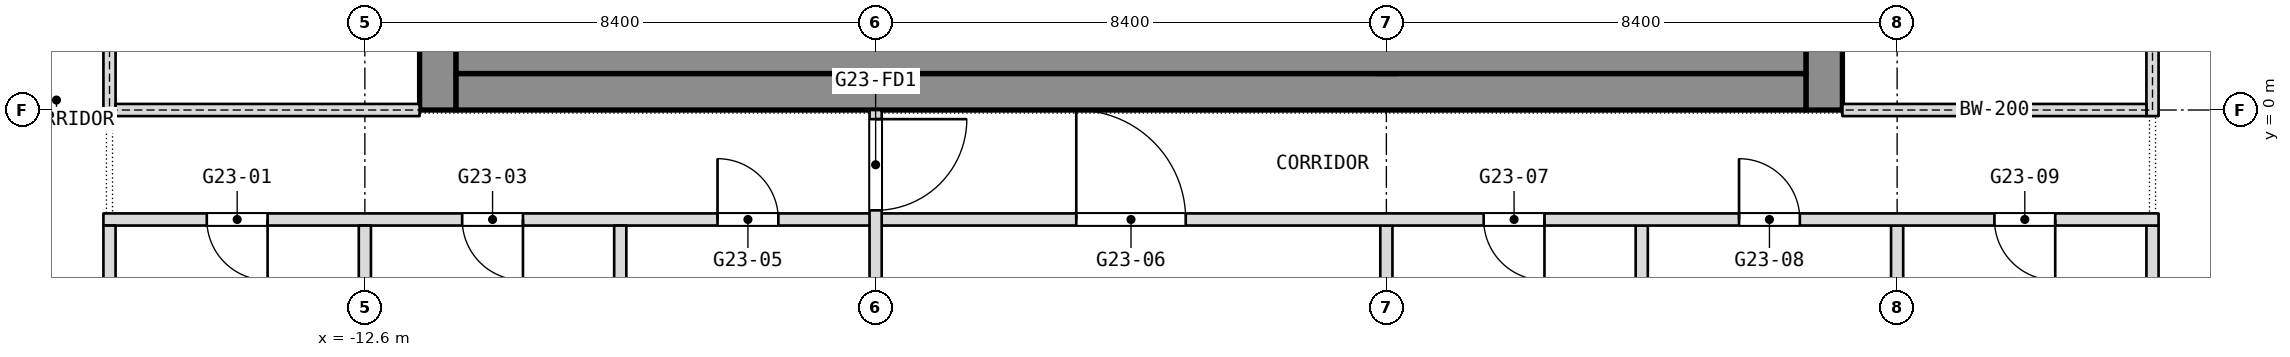
"""IFC4 building model, lengths in metres.
Left out: names, types, materials, properties, quantities, classifications, styles, units other than length and angle.
Written with IfcOpenShell. Run it as: python <this file> out.ifc"""

import sys

from ifc_helpers import new_model, si_unit, direction, frame, frame_2d, origin, place, context, subcontext, project, spatial, rectangle, extrude, element, fill, save


model = new_model("IFC4")
c1 = context("Model", 3, precision=1e-05, world=origin(), true_north=direction((0.0, 1.0)))
c2 = subcontext(c1, "Body", "Model", "MODEL_VIEW")
j1 = project(units=[si_unit("LENGTHUNIT", "METRE"), si_unit("PLANEANGLEUNIT", "RADIAN")], contexts=[c1])
p1 = place(None, origin())
s1 = spatial("IfcSite", under=j1, at=p1, CompositionType="ELEMENT")
p2 = place(p1, origin())
s2 = spatial("IfcBuilding", under=s1, at=p2, CompositionType="ELEMENT")
p3 = place(p2, frame((0.0, 0.0, 274.1)))
s3 = spatial("IfcBuildingStorey", under=s2, at=p3, CompositionType="ELEMENT", Elevation=274.1)
p4 = place(p3, frame((11.4, 0.0, 0.0), z_axis=(0.0, 0.0, 1.0), x_axis=(0.0, 1.0, 0.0)))
e1 = element("IfcWall", 1, at=p4, inside=s3, PredefinedType="SHEAR", context=c2, shape_type="SweptSolid", body=[
    extrude(rectangle(XDim=16.8, YDim=0.6, at=frame_2d((8.4, 0.0))), origin(), (0.0, 0.0, 1.0), 3.6),
])
p5 = place(p4, frame((2.3, 0.0, 0.0)))
e2 = element("IfcOpeningElement", 2, at=p5, cuts=e1, PredefinedType="OPENING", context=c2, shape_type="SweptSolid", body=[
    extrude(rectangle(XDim=1.1, YDim=2.1, at=frame_2d((0.55, 1.05))), frame((0.0, 0.3, 0.0), z_axis=(0.0, -1.0, 0.0), x_axis=(1.0, 0.0, 0.0)), (0.0, 0.0, 1.0), 0.6),
])
p6 = place(p4, frame((4.85, 0.0, 0.0)))
e3 = element("IfcOpeningElement", 3, at=p6, cuts=e1, PredefinedType="OPENING", context=c2, shape_type="SweptSolid", body=[
    extrude(rectangle(XDim=1.1, YDim=2.1, at=frame_2d((0.55, 1.05))), frame((0.0, 0.3, 0.0), z_axis=(0.0, -1.0, 0.0), x_axis=(1.0, 0.0, 0.0)), (0.0, 0.0, 1.0), 0.6),
])
p7 = place(p4, frame((6.825, 0.0, 0.0)))
e4 = element("IfcOpeningElement", 4, at=p7, cuts=e1, PredefinedType="OPENING", context=c2, shape_type="SweptSolid", body=[
    extrude(rectangle(XDim=1.2, YDim=2.1, at=frame_2d((0.6, 1.05))), frame((0.0, 0.3, 0.0), z_axis=(0.0, -1.0, 0.0), x_axis=(1.0, 0.0, 0.0)), (0.0, 0.0, 1.0), 0.6),
])
p8 = place(p4, frame((13.4, 0.0, 0.0)))
e5 = element("IfcOpeningElement", 5, at=p8, cuts=e1, PredefinedType="OPENING", context=c2, shape_type="SweptSolid", body=[
    extrude(rectangle(XDim=1.1, YDim=2.1, at=frame_2d((0.55, 1.05))), frame((0.0, 0.3, 0.0), z_axis=(0.0, -1.0, 0.0), x_axis=(1.0, 0.0, 0.0)), (0.0, 0.0, 1.0), 0.6),
])
p9 = place(p4, frame((10.85, 0.0, 0.0)))
e6 = element("IfcOpeningElement", 6, at=p9, cuts=e1, PredefinedType="OPENING", context=c2, shape_type="SweptSolid", body=[
    extrude(rectangle(XDim=1.1, YDim=2.1, at=frame_2d((0.55, 1.05))), frame((0.0, 0.3, 0.0), z_axis=(0.0, -1.0, 0.0), x_axis=(1.0, 0.0, 0.0)), (0.0, 0.0, 1.0), 0.6),
])
p10 = place(p4, frame((8.775, 0.0, 0.0)))
e7 = element("IfcOpeningElement", 7, at=p10, cuts=e1, PredefinedType="OPENING", context=c2, shape_type="SweptSolid", body=[
    extrude(rectangle(XDim=1.2, YDim=2.1, at=frame_2d((0.6, 1.05))), frame((0.0, 0.3, 0.0), z_axis=(0.0, -1.0, 0.0), x_axis=(1.0, 0.0, 0.0)), (0.0, 0.0, 1.0), 0.6),
])
p11 = place(p3, frame((-11.4, 0.0, 0.0), z_axis=(0.0, 0.0, 1.0), x_axis=(0.0, 1.0, 0.0)))
e8 = element("IfcWall", 8, at=p11, inside=s3, PredefinedType="SHEAR", context=c2, shape_type="SweptSolid", body=[
    extrude(rectangle(XDim=16.8, YDim=0.6, at=frame_2d((8.4, 0.0))), origin(), (0.0, 0.0, 1.0), 3.6),
])
p12 = place(p11, frame((3.6, 0.0, 0.0)))
e9 = element("IfcOpeningElement", 9, at=p12, cuts=e8, PredefinedType="OPENING", context=c2, shape_type="SweptSolid", body=[
    extrude(rectangle(XDim=0.9, YDim=2.1, at=frame_2d((0.45, 1.05))), frame((0.0, 0.3, 0.0), z_axis=(0.0, -1.0, 0.0), x_axis=(1.0, 0.0, 0.0)), (0.0, 0.0, 1.0), 0.6),
])
p13 = place(p11, frame((6.825, 0.0, 0.0)))
e10 = element("IfcOpeningElement", 10, at=p13, cuts=e8, PredefinedType="OPENING", context=c2, shape_type="SweptSolid", body=[
    extrude(rectangle(XDim=1.2, YDim=2.1, at=frame_2d((0.6, 1.05))), frame((0.0, 0.3, 0.0), z_axis=(0.0, -1.0, 0.0), x_axis=(1.0, 0.0, 0.0)), (0.0, 0.0, 1.0), 0.6),
])
p14 = place(p11, frame((14.137, 0.0, 0.0)))
e11 = element("IfcOpeningElement", 11, at=p14, cuts=e8, PredefinedType="OPENING", context=c2, shape_type="SweptSolid", body=[
    extrude(rectangle(XDim=0.9, YDim=2.1, at=frame_2d((0.45, 1.05))), frame((0.0, 0.3, 0.0), z_axis=(0.0, -1.0, 0.0), x_axis=(1.0, 0.0, 0.0)), (0.0, 0.0, 1.0), 0.6),
])
p15 = place(p11, frame((11.512, 0.0, 0.0)))
e12 = element("IfcOpeningElement", 12, at=p15, cuts=e8, PredefinedType="OPENING", context=c2, shape_type="SweptSolid", body=[
    extrude(rectangle(XDim=0.9, YDim=2.1, at=frame_2d((0.45, 1.05))), frame((0.0, 0.3, 0.0), z_axis=(0.0, -1.0, 0.0), x_axis=(1.0, 0.0, 0.0)), (0.0, 0.0, 1.0), 0.6),
])
p16 = place(p11, frame((8.775, 0.0, 0.0)))
e13 = element("IfcOpeningElement", 13, at=p16, cuts=e8, PredefinedType="OPENING", context=c2, shape_type="SweptSolid", body=[
    extrude(rectangle(XDim=1.2, YDim=2.1, at=frame_2d((0.6, 1.05))), frame((0.0, 0.3, 0.0), z_axis=(0.0, -1.0, 0.0), x_axis=(1.0, 0.0, 0.0)), (0.0, 0.0, 1.0), 0.6),
])
p17 = place(p3, frame((-11.1, 0.3, 0.0), z_axis=(0.0, 0.0, 1.0), x_axis=(1.0, 0.0, 0.0)))
e14 = element("IfcWall", 14, at=p17, inside=s3, PredefinedType="SHEAR", context=c2, shape_type="SweptSolid", body=[
    extrude(rectangle(XDim=22.2, YDim=0.6, at=frame_2d((11.1, 0.0))), origin(), (0.0, 0.0, 1.0), 3.6),
])
p18 = place(p3, frame((-4.2, 0.6, 0.0), z_axis=(0.0, 0.0, 1.0), x_axis=(0.0, 1.0, 0.0)))
e15 = element("IfcWall", 15, at=p18, inside=s3, PredefinedType="SHEAR", context=c2, shape_type="SweptSolid", body=[
    extrude(rectangle(XDim=15.6, YDim=0.35, at=frame_2d((7.8, 0.0))), origin(), (0.0, 0.0, 1.0), 3.6),
])
p19 = place(p18, frame((8.7, 0.0, 0.0)))
e16 = element("IfcOpeningElement", 16, at=p19, cuts=e15, PredefinedType="OPENING", context=c2, shape_type="SweptSolid", body=[
    extrude(rectangle(XDim=1.2, YDim=2.1, at=frame_2d((0.6, 1.05))), frame((0.0, 0.175, 0.0), z_axis=(0.0, -1.0, 0.0), x_axis=(1.0, 0.0, 0.0)), (0.0, 0.0, 1.0), 0.35),
])
p20 = place(p3, frame((4.2, 0.6, 0.0), z_axis=(0.0, 0.0, 1.0), x_axis=(0.0, 1.0, 0.0)))
e17 = element("IfcWall", 17, at=p20, inside=s3, PredefinedType="SHEAR", context=c2, shape_type="SweptSolid", body=[
    extrude(rectangle(XDim=15.6, YDim=0.35, at=frame_2d((7.8, 0.0))), origin(), (0.0, 0.0, 1.0), 3.6),
])
p21 = place(p20, frame((6.15, 0.0, 0.0)))
e18 = element("IfcOpeningElement", 18, at=p21, cuts=e17, PredefinedType="OPENING", context=c2, shape_type="SweptSolid", body=[
    extrude(rectangle(XDim=1.2, YDim=2.1, at=frame_2d((0.6, 1.05))), frame((0.0, 0.175, 0.0), z_axis=(0.0, -1.0, 0.0), x_axis=(1.0, 0.0, 0.0)), (0.0, 0.0, 1.0), 0.35),
])
p22 = place(p3, frame((16.8, -11.8, 0.0), z_axis=(0.0, 0.0, 1.0), x_axis=(0.0, 1.0, 0.0)))
e19 = element("IfcWall", 19, at=p22, inside=s3, PredefinedType="PARTITIONING", context=c2, shape_type="SweptSolid", body=[
    extrude(rectangle(XDim=9.9, YDim=0.2, at=frame_2d((4.95, 0.0))), origin(), (0.0, 0.0, 1.0), 3.34),
])
for number, where, z_axis, x_axis in (
    (20, (12.6, -11.6, 0.0), (0.0, 0.0, 1.0), (0.0, 1.0, 0.0)),
    (21, (8.4, -11.6, 0.0), (0.0, 0.0, 1.0), (0.0, 1.0, 0.0)),
    (22, (4.2, -11.6, 0.0), (0.0, 0.0, 1.0), (0.0, 1.0, 0.0)),
):
    element("IfcWall", number, at=place(p3, frame(where, z_axis=z_axis, x_axis=x_axis)), inside=s3, PredefinedType="PARTITIONING", context=c2, shape_type="SweptSolid", body=[
        extrude(rectangle(XDim=9.7, YDim=0.2, at=frame_2d((4.85, 0.0))), origin(), (0.0, 0.0, 1.0), 3.34),
    ])
p23 = place(p3, frame((-16.9, -1.8, 0.0), z_axis=(0.0, 0.0, 1.0), x_axis=(1.0, 0.0, 0.0)))
e23 = element("IfcWall", 23, at=p23, inside=s3, PredefinedType="PARTITIONING", context=c2, shape_type="SweptSolid", body=[
    extrude(rectangle(XDim=33.8, YDim=0.2, at=frame_2d((16.9, 0.0))), origin(), (0.0, 0.0, 1.0), 3.34),
])
p24 = place(p23, frame((1.7, 0.0, 0.0)))
e24 = element("IfcOpeningElement", 24, at=p24, cuts=e23, PredefinedType="OPENING", context=c2, shape_type="SweptSolid", body=[
    extrude(rectangle(XDim=1.0, YDim=2.1, at=frame_2d((0.5, 1.05))), frame((0.0, 0.1, 0.0), z_axis=(0.0, -1.0, 0.0), x_axis=(1.0, 0.0, 0.0)), (0.0, 0.0, 1.0), 0.2),
])
p25 = place(p23, frame((5.9, 0.0, 0.0)))
e25 = element("IfcOpeningElement", 25, at=p25, cuts=e23, PredefinedType="OPENING", context=c2, shape_type="SweptSolid", body=[
    extrude(rectangle(XDim=1.0, YDim=2.1, at=frame_2d((0.5, 1.05))), frame((0.0, 0.1, 0.0), z_axis=(0.0, -1.0, 0.0), x_axis=(1.0, 0.0, 0.0)), (0.0, 0.0, 1.0), 0.2),
])
p26 = place(p23, frame((10.1, 0.0, 0.0)))
e26 = element("IfcOpeningElement", 26, at=p26, cuts=e23, PredefinedType="OPENING", context=c2, shape_type="SweptSolid", body=[
    extrude(rectangle(XDim=1.0, YDim=2.1, at=frame_2d((0.5, 1.05))), frame((0.0, 0.1, 0.0), z_axis=(0.0, -1.0, 0.0), x_axis=(1.0, 0.0, 0.0)), (0.0, 0.0, 1.0), 0.2),
])
p27 = place(p23, frame((16.0, 0.0, 0.0)))
e27 = element("IfcOpeningElement", 27, at=p27, cuts=e23, PredefinedType="OPENING", context=c2, shape_type="SweptSolid", body=[
    extrude(rectangle(XDim=1.8, YDim=2.1, at=frame_2d((0.9, 1.05))), frame((0.0, 0.1, 0.0), z_axis=(0.0, -1.0, 0.0), x_axis=(1.0, 0.0, 0.0)), (0.0, 0.0, 1.0), 0.2),
])
p28 = place(p23, frame((22.7, 0.0, 0.0)))
e28 = element("IfcOpeningElement", 28, at=p28, cuts=e23, PredefinedType="OPENING", context=c2, shape_type="SweptSolid", body=[
    extrude(rectangle(XDim=1.0, YDim=2.1, at=frame_2d((0.5, 1.05))), frame((0.0, 0.1, 0.0), z_axis=(0.0, -1.0, 0.0), x_axis=(1.0, 0.0, 0.0)), (0.0, 0.0, 1.0), 0.2),
])
p29 = place(p23, frame((26.9, 0.0, 0.0)))
e29 = element("IfcOpeningElement", 29, at=p29, cuts=e23, PredefinedType="OPENING", context=c2, shape_type="SweptSolid", body=[
    extrude(rectangle(XDim=1.0, YDim=2.1, at=frame_2d((0.5, 1.05))), frame((0.0, 0.1, 0.0), z_axis=(0.0, -1.0, 0.0), x_axis=(1.0, 0.0, 0.0)), (0.0, 0.0, 1.0), 0.2),
])
p30 = place(p23, frame((31.1, 0.0, 0.0)))
e30 = element("IfcOpeningElement", 30, at=p30, cuts=e23, PredefinedType="OPENING", context=c2, shape_type="SweptSolid", body=[
    extrude(rectangle(XDim=1.0, YDim=2.1, at=frame_2d((0.5, 1.05))), frame((0.0, 0.1, 0.0), z_axis=(0.0, -1.0, 0.0), x_axis=(1.0, 0.0, 0.0)), (0.0, 0.0, 1.0), 0.2),
])
p31 = place(p3, frame((-4.2, -13.6, 0.0), z_axis=(0.0, 0.0, 1.0), x_axis=(0.0, 1.0, 0.0)))
e31 = element("IfcWall", 31, at=p31, inside=s3, PredefinedType="PARTITIONING", context=c2, shape_type="SweptSolid", body=[
    extrude(rectangle(XDim=13.6, YDim=0.2, at=frame_2d((6.8, 0.0))), origin(), (0.0, 0.0, 1.0), 3.34),
])
p32 = place(p31, frame((11.95, 0.0, 0.0)))
e32 = element("IfcOpeningElement", 32, at=p32, cuts=e31, PredefinedType="OPENING", context=c2, shape_type="SweptSolid", body=[
    extrude(rectangle(XDim=1.5, YDim=2.1, at=frame_2d((0.75, 1.05))), frame((0.0, 0.1, 0.0), z_axis=(0.0, -1.0, 0.0), x_axis=(1.0, 0.0, 0.0)), (0.0, 0.0, 1.0), 0.2),
])
p33 = place(p31, frame((0.25, 0.0, 0.0)))
e33 = element("IfcOpeningElement", 33, at=p33, cuts=e31, PredefinedType="OPENING", context=c2, shape_type="SweptSolid", body=[
    extrude(rectangle(XDim=1.5, YDim=2.1, at=frame_2d((0.75, 1.05))), frame((0.0, 0.1, 0.0), z_axis=(0.0, -1.0, 0.0), x_axis=(1.0, 0.0, 0.0)), (0.0, 0.0, 1.0), 0.2),
])
for number, where, z_axis, x_axis in (
    (34, (-8.4, -8.5, 0.0), (0.0, 0.0, 1.0), (0.0, 1.0, 0.0)),
    (35, (-12.6, -8.5, 0.0), (0.0, 0.0, 1.0), (0.0, 1.0, 0.0)),
):
    element("IfcWall", number, at=place(p3, frame(where, z_axis=z_axis, x_axis=x_axis)), inside=s3, PredefinedType="PARTITIONING", context=c2, shape_type="SweptSolid", body=[
        extrude(rectangle(XDim=6.6, YDim=0.2, at=frame_2d((3.3, 0.0))), origin(), (0.0, 0.0, 1.0), 3.34),
    ])
p34 = place(p3, frame((-16.8, -8.7, 0.0), z_axis=(0.0, 0.0, 1.0), x_axis=(0.0, 1.0, 0.0)))
e36 = element("IfcWall", 36, at=p34, inside=s3, PredefinedType="PARTITIONING", context=c2, shape_type="SweptSolid", body=[
    extrude(rectangle(XDim=6.8, YDim=0.2, at=frame_2d((3.4, 0.0))), origin(), (0.0, 0.0, 1.0), 3.34),
])
p35 = place(p3, frame((-11.1, 1.05, 0.0), z_axis=(0.0, 0.0, 1.0), x_axis=(1.0, 0.0, 0.0)))
e37 = element("IfcWall", 37, at=p35, inside=s3, PredefinedType="PARTITIONING", context=c2, shape_type="SweptSolid", body=[
    extrude(rectangle(XDim=22.2, YDim=0.9, at=frame_2d((11.1, 0.0))), origin(), (0.0, 0.0, 1.0), 3.34),
])
p36 = place(p3, frame((-16.8, -0.1, 0.0), z_axis=(0.0, 0.0, 1.0), x_axis=(0.0, 1.0, 0.0)))
e38 = element("IfcWall", 38, at=p36, inside=s3, PredefinedType="PARTITIONING", context=c2, shape_type="SweptSolid", body=[
    extrude(rectangle(XDim=17.0, YDim=0.2, at=frame_2d((8.5, 0.0))), origin(), (0.0, 0.0, 1.0), 3.34),
])
p37 = place(p36, frame((2.2, 0.0, 0.0)))
e39 = element("IfcOpeningElement", 39, at=p37, cuts=e38, PredefinedType="OPENING", context=c2, shape_type="SweptSolid", body=[
    extrude(rectangle(XDim=1.8, YDim=2.1, at=frame_2d((0.9, 1.05))), frame((0.0, 0.1, 0.0), z_axis=(0.0, -1.0, 0.0), x_axis=(1.0, 0.0, 0.0)), (0.0, 0.0, 1.0), 0.2),
])
p38 = place(p36, frame((13.0, 0.0, 0.0)))
e40 = element("IfcOpeningElement", 40, at=p38, cuts=e38, PredefinedType="OPENING", context=c2, shape_type="SweptSolid", body=[
    extrude(rectangle(XDim=1.8, YDim=2.1, at=frame_2d((0.9, 1.05))), frame((0.0, 0.1, 0.0), z_axis=(0.0, -1.0, 0.0), x_axis=(1.0, 0.0, 0.0)), (0.0, 0.0, 1.0), 0.2),
])
p39 = place(p3, frame((-16.7, 0.0, 0.0), z_axis=(0.0, 0.0, 1.0), x_axis=(1.0, 0.0, 0.0)))
e41 = element("IfcWall", 41, at=p39, inside=s3, PredefinedType="PARTITIONING", context=c2, shape_type="SweptSolid", body=[
    extrude(rectangle(XDim=5.0, YDim=0.2, at=frame_2d((2.5, 0.0))), origin(), (0.0, 0.0, 1.0), 3.0),
])
p40 = place(p3, frame((16.8, -0.1, 0.0), z_axis=(0.0, 0.0, 1.0), x_axis=(0.0, 1.0, 0.0)))
e42 = element("IfcWall", 42, at=p40, inside=s3, PredefinedType="PARTITIONING", context=c2, shape_type="SweptSolid", body=[
    extrude(rectangle(XDim=17.0, YDim=0.2, at=frame_2d((8.5, 0.0))), origin(), (0.0, 0.0, 1.0), 3.34),
])
p41 = place(p40, frame((2.2, 0.0, 0.0)))
e43 = element("IfcOpeningElement", 43, at=p41, cuts=e42, PredefinedType="OPENING", context=c2, shape_type="SweptSolid", body=[
    extrude(rectangle(XDim=1.8, YDim=2.1, at=frame_2d((0.9, 1.05))), frame((0.0, 0.1, 0.0), z_axis=(0.0, -1.0, 0.0), x_axis=(1.0, 0.0, 0.0)), (0.0, 0.0, 1.0), 0.2),
])
p42 = place(p40, frame((13.0, 0.0, 0.0)))
e44 = element("IfcOpeningElement", 44, at=p42, cuts=e42, PredefinedType="OPENING", context=c2, shape_type="SweptSolid", body=[
    extrude(rectangle(XDim=1.8, YDim=2.1, at=frame_2d((0.9, 1.05))), frame((0.0, 0.1, 0.0), z_axis=(0.0, -1.0, 0.0), x_axis=(1.0, 0.0, 0.0)), (0.0, 0.0, 1.0), 0.2),
])
p43 = place(p3, frame((11.7, 0.0, 0.0), z_axis=(0.0, 0.0, 1.0), x_axis=(1.0, 0.0, 0.0)))
e45 = element("IfcWall", 45, at=p43, inside=s3, PredefinedType="PARTITIONING", context=c2, shape_type="SweptSolid", body=[
    extrude(rectangle(XDim=5.0, YDim=0.2, at=frame_2d((2.5, 0.0))), origin(), (0.0, 0.0, 1.0), 3.0),
])
p44 = place(p24, origin())
e46 = element("IfcDoor", 46, at=p44, inside=s3, OperationType="SINGLE_SWING_LEFT", PredefinedType="DOOR", context=c2, shape_type="SweptSolid", body=[
    extrude(rectangle(XDim=1.0, YDim=2.1, at=frame_2d((0.5, 1.05))), frame((0.0, 0.025, 0.0), z_axis=(0.0, -1.0, 0.0), x_axis=(1.0, 0.0, 0.0)), (0.0, 0.0, 1.0), 0.05),
])
fill(e24, e46)
p45 = place(p25, origin())
e47 = element("IfcDoor", 47, at=p45, inside=s3, OperationType="SINGLE_SWING_LEFT", PredefinedType="DOOR", context=c2, shape_type="SweptSolid", body=[
    extrude(rectangle(XDim=1.0, YDim=2.1, at=frame_2d((0.5, 1.05))), frame((0.0, 0.025, 0.0), z_axis=(0.0, -1.0, 0.0), x_axis=(1.0, 0.0, 0.0)), (0.0, 0.0, 1.0), 0.05),
])
fill(e25, e47)
p46 = place(p26, origin())
e48 = element("IfcDoor", 48, at=p46, inside=s3, OperationType="SINGLE_SWING_RIGHT", PredefinedType="DOOR", context=c2, shape_type="SweptSolid", body=[
    extrude(rectangle(XDim=1.0, YDim=2.1, at=frame_2d((0.5, 1.05))), frame((0.0, 0.025, 0.0), z_axis=(0.0, -1.0, 0.0), x_axis=(1.0, 0.0, 0.0)), (0.0, 0.0, 1.0), 0.05),
])
fill(e26, e48)
p47 = place(p27, origin())
e49 = element("IfcDoor", 49, at=p47, inside=s3, OperationType="DOUBLE_DOOR_SINGLE_SWING", PredefinedType="DOOR", context=c2, shape_type="SweptSolid", body=[
    extrude(rectangle(XDim=1.8, YDim=2.1, at=frame_2d((0.9, 1.05))), frame((0.0, 0.025, 0.0), z_axis=(0.0, -1.0, 0.0), x_axis=(1.0, 0.0, 0.0)), (0.0, 0.0, 1.0), 0.05),
])
fill(e27, e49)
p48 = place(p28, origin())
e50 = element("IfcDoor", 50, at=p48, inside=s3, OperationType="SINGLE_SWING_RIGHT", PredefinedType="DOOR", context=c2, shape_type="SweptSolid", body=[
    extrude(rectangle(XDim=1.0, YDim=2.1, at=frame_2d((0.5, 1.05))), frame((0.0, 0.025, 0.0), z_axis=(0.0, -1.0, 0.0), x_axis=(1.0, 0.0, 0.0)), (0.0, 0.0, 1.0), 0.05),
])
fill(e28, e50)
p49 = place(p29, origin())
e51 = element("IfcDoor", 51, at=p49, inside=s3, OperationType="SINGLE_SWING_LEFT", PredefinedType="DOOR", context=c2, shape_type="SweptSolid", body=[
    extrude(rectangle(XDim=1.0, YDim=2.1, at=frame_2d((0.5, 1.05))), frame((0.0, 0.025, 0.0), z_axis=(0.0, -1.0, 0.0), x_axis=(1.0, 0.0, 0.0)), (0.0, 0.0, 1.0), 0.05),
])
fill(e29, e51)
p50 = place(p30, origin())
e52 = element("IfcDoor", 52, at=p50, inside=s3, OperationType="SINGLE_SWING_RIGHT", PredefinedType="DOOR", context=c2, shape_type="SweptSolid", body=[
    extrude(rectangle(XDim=1.0, YDim=2.1, at=frame_2d((0.5, 1.05))), frame((0.0, 0.025, 0.0), z_axis=(0.0, -1.0, 0.0), x_axis=(1.0, 0.0, 0.0)), (0.0, 0.0, 1.0), 0.05),
])
fill(e30, e52)
p51 = place(p32, origin())
e53 = element("IfcDoor", 53, at=p51, inside=s3, OperationType="DOUBLE_DOOR_DOUBLE_SWING", PredefinedType="DOOR", context=c2, shape_type="SweptSolid", body=[
    extrude(rectangle(XDim=1.5, YDim=2.1, at=frame_2d((0.75, 1.05))), frame((0.0, 0.025, 0.0), z_axis=(0.0, -1.0, 0.0), x_axis=(1.0, 0.0, 0.0)), (0.0, 0.0, 1.0), 0.05),
])
fill(e32, e53)
save(model, sys.argv[1])
